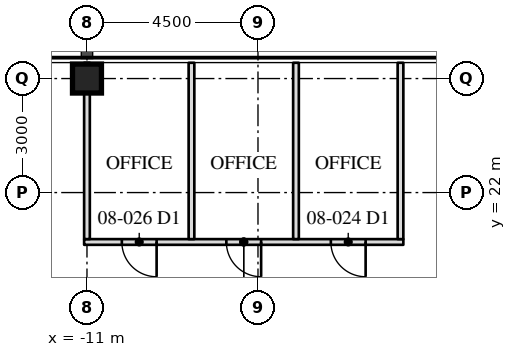
"""IFC4 building model, lengths in metres.
Left out: names, types, materials, properties, quantities, classifications, styles, units other than length and angle.
Written with IfcOpenShell. Run it as: python <this file> out.ifc"""

import sys

from ifc_helpers import new_model, si_unit, direction, frame, frame_2d, origin, origin_2d, place, context, subcontext, project, spatial, rectangle, hollow_rectangle, extrude, element, fill, save


model = new_model("IFC4")
c1 = context("Model", 3, precision=1e-05, world=origin(), true_north=direction((0.0, 1.0)))
c2 = subcontext(c1, "Body", "Model", "MODEL_VIEW")
j1 = project(units=[si_unit("LENGTHUNIT", "METRE"), si_unit("PLANEANGLEUNIT", "RADIAN")], contexts=[c1])
p1 = place(None, origin())
s1 = spatial("IfcSite", under=j1, at=p1, CompositionType="ELEMENT")
p2 = place(p1, origin())
s2 = spatial("IfcBuilding", under=s1, at=p2, CompositionType="ELEMENT")
p3 = place(p2, frame((0.0, 0.0, 36.5)))
s3 = spatial("IfcBuildingStorey", under=s2, at=p3, CompositionType="ELEMENT", Elevation=36.5)
p4 = place(p3, frame((-11.0, 25.0, 0.0), z_axis=(0.0, 0.0, 1.0), x_axis=(1.0, 0.0, 0.0)))
e1 = element("IfcColumn", 1, at=p4, inside=s3, PredefinedType="COLUMN", context=c2, shape_type="SweptSolid", body=[
    extrude(hollow_rectangle(XDim=0.762, YDim=0.762, WallThickness=0.127, at=origin_2d()), origin(), (0.0, 0.0, 1.0), 4.1),
])
p5 = place(p3, frame((-2.675, 20.7, 0.0), z_axis=(0.0, 0.0, 1.0), x_axis=(-1.0, 0.0, 0.0)))
e2 = element("IfcWall", 2, at=p5, inside=s3, PredefinedType="PARTITIONING", context=c2, shape_type="SweptSolid", body=[
    extrude(rectangle(XDim=8.4, YDim=0.15, at=frame_2d((4.2, 0.0))), origin(), (0.0, 0.0, 1.0), 3.91),
])
p6 = place(p5, frame((0.992, 0.0, 0.0)))
e3 = element("IfcOpeningElement", 3, at=p6, cuts=e2, PredefinedType="OPENING", context=c2, shape_type="SweptSolid", body=[
    extrude(rectangle(XDim=0.915, YDim=2.134, at=frame_2d((0.458, 1.067))), frame((0.0, 0.085, 0.0), z_axis=(0.0, -1.0, 0.0), x_axis=(1.0, 0.0, 0.0)), (0.0, 0.0, 1.0), 0.17),
])
p7 = place(p5, frame((3.742, 0.0, 0.0)))
e4 = element("IfcOpeningElement", 4, at=p7, cuts=e2, PredefinedType="OPENING", context=c2, shape_type="SweptSolid", body=[
    extrude(rectangle(XDim=0.915, YDim=2.134, at=frame_2d((0.458, 1.067))), frame((0.0, 0.085, 0.0), z_axis=(0.0, -1.0, 0.0), x_axis=(1.0, 0.0, 0.0)), (0.0, 0.0, 1.0), 0.17),
])
p8 = place(p5, frame((6.492, 0.0, 0.0)))
e5 = element("IfcOpeningElement", 5, at=p8, cuts=e2, PredefinedType="OPENING", context=c2, shape_type="SweptSolid", body=[
    extrude(rectangle(XDim=0.915, YDim=2.134, at=frame_2d((0.458, 1.067))), frame((0.0, 0.085, 0.0), z_axis=(0.0, -1.0, 0.0), x_axis=(1.0, 0.0, 0.0)), (0.0, 0.0, 1.0), 0.17),
])
for number, where, z_axis, x_axis in (
    (6, (-2.75, 20.775, 0.0), (0.0, 0.0, 1.0), (0.0, 1.0, 0.0)),
    (7, (-5.5, 20.775, 0.0), (0.0, 0.0, 1.0), (0.0, 1.0, 0.0)),
    (8, (-8.25, 20.775, 0.0), (0.0, 0.0, 1.0), (0.0, 1.0, 0.0)),
):
    element("IfcWall", number, at=place(p3, frame(where, z_axis=z_axis, x_axis=x_axis)), inside=s3, PredefinedType="PARTITIONING", context=c2, shape_type="SweptSolid", body=[
        extrude(rectangle(XDim=4.64, YDim=0.15, at=frame_2d((2.32, 0.0))), origin(), (0.0, 0.0, 1.0), 3.91),
    ])
p9 = place(p3, frame((-11.0, 20.775, 0.0), z_axis=(0.0, 0.0, 1.0), x_axis=(0.0, 1.0, 0.0)))
e9 = element("IfcWall", 9, at=p9, inside=s3, PredefinedType="PARTITIONING", context=c2, shape_type="SweptSolid", body=[
    extrude(rectangle(XDim=4.64, YDim=0.15, at=frame_2d((2.32, 0.0))), origin(), (0.0, 0.0, 1.0), 3.13),
])
p10 = place(p6, origin())
e10 = element("IfcDoor", 10, at=p10, inside=s3, OperationType="SINGLE_SWING_LEFT", PredefinedType="DOOR", context=c2, shape_type="SweptSolid", body=[
    extrude(rectangle(XDim=0.915, YDim=2.134, at=frame_2d((0.458, 1.067))), frame((0.0, 0.025, 0.0), z_axis=(0.0, -1.0, 0.0), x_axis=(1.0, 0.0, 0.0)), (0.0, 0.0, 1.0), 0.05),
])
fill(e3, e10)
p11 = place(p7, origin())
e11 = element("IfcDoor", 11, at=p11, inside=s3, OperationType="SINGLE_SWING_LEFT", PredefinedType="DOOR", context=c2, shape_type="SweptSolid", body=[
    extrude(rectangle(XDim=0.915, YDim=2.134, at=frame_2d((0.458, 1.067))), frame((0.0, 0.025, 0.0), z_axis=(0.0, -1.0, 0.0), x_axis=(1.0, 0.0, 0.0)), (0.0, 0.0, 1.0), 0.05),
])
fill(e4, e11)
p12 = place(p8, origin())
e12 = element("IfcDoor", 12, at=p12, inside=s3, OperationType="SINGLE_SWING_LEFT", PredefinedType="DOOR", context=c2, shape_type="SweptSolid", body=[
    extrude(rectangle(XDim=0.915, YDim=2.134, at=frame_2d((0.458, 1.067))), frame((0.0, 0.025, 0.0), z_axis=(0.0, -1.0, 0.0), x_axis=(1.0, 0.0, 0.0)), (0.0, 0.0, 1.0), 0.05),
])
fill(e5, e12)
save(model, sys.argv[1])
